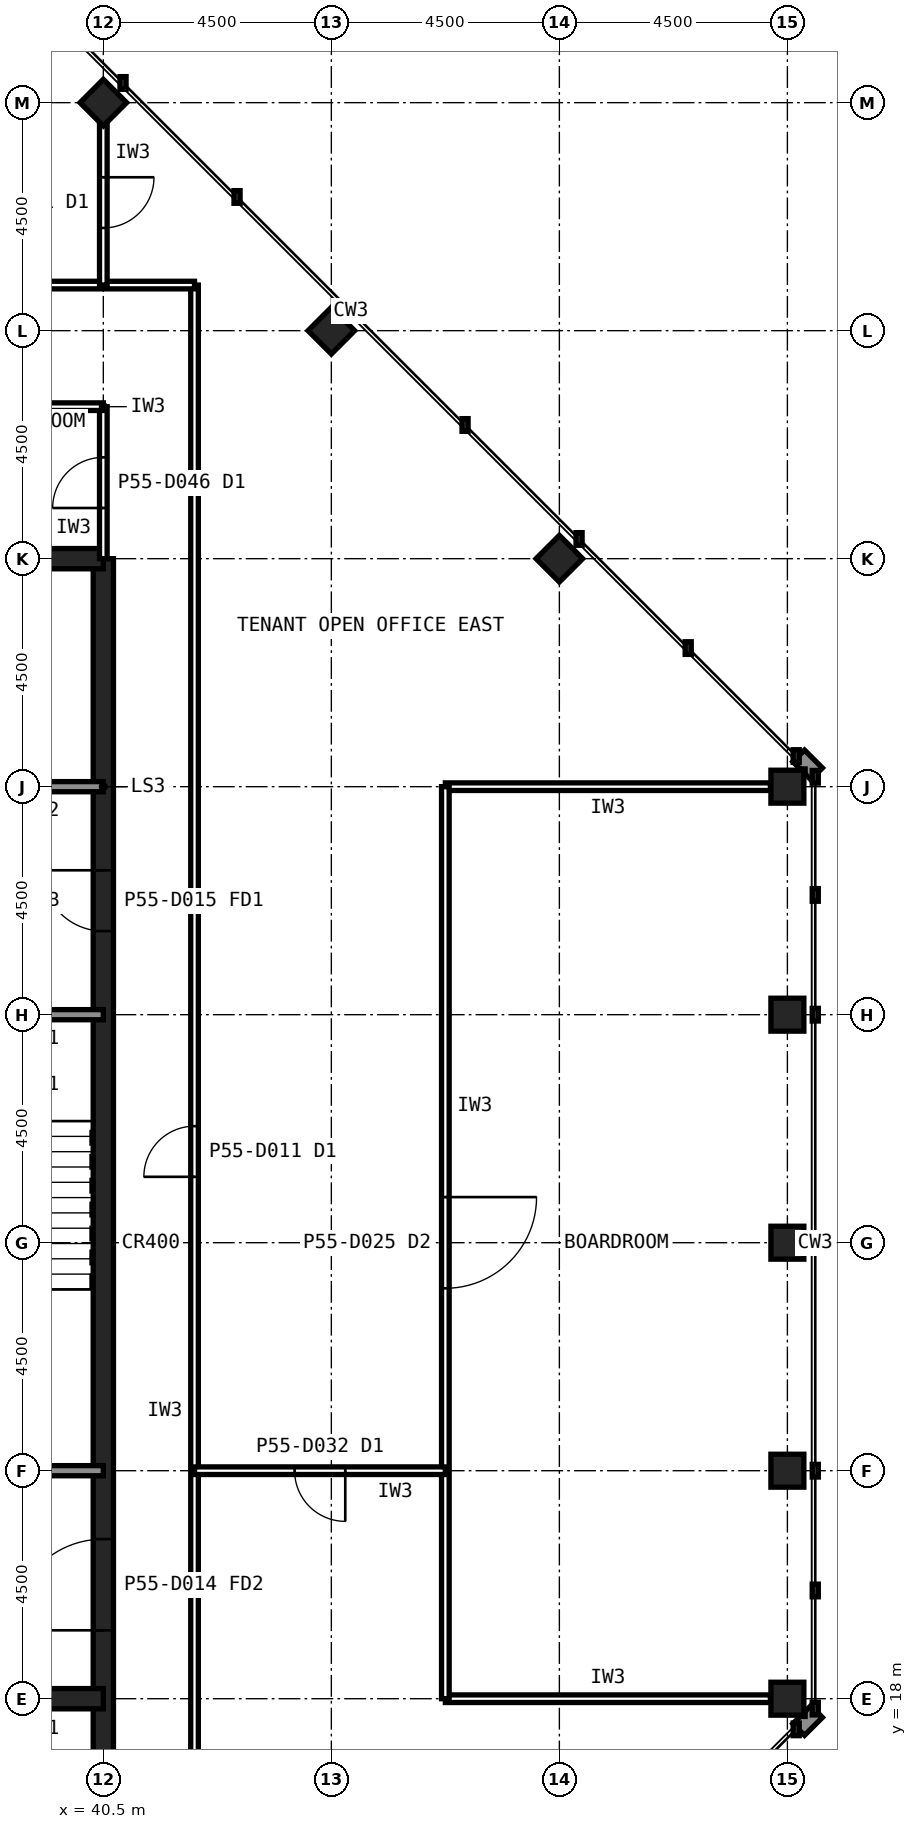
"""IFC4 building model, lengths in metres.
Left out: names, types, materials, properties, quantities, classifications, styles, units other than length and angle.
Written with IfcOpenShell. Run it as: python <this file> out.ifc"""

import sys

from ifc_helpers import new_model, si_unit, direction, frame, frame_2d, origin, origin_2d, place, context, subcontext, project, spatial, rectangle, hollow_rectangle, extrude, element, fill, save


model = new_model("IFC4")
c1 = context("Model", 3, precision=1e-05, world=origin(), true_north=direction((0.0, 1.0)))
c2 = subcontext(c1, "Body", "Model", "MODEL_VIEW")
j1 = project(units=[si_unit("LENGTHUNIT", "METRE"), si_unit("PLANEANGLEUNIT", "RADIAN")], contexts=[c1])
p1 = place(None, origin())
s1 = spatial("IfcSite", under=j1, at=p1, CompositionType="ELEMENT")
p2 = place(p1, origin())
s2 = spatial("IfcBuilding", under=s1, at=p2, CompositionType="ELEMENT")
p3 = place(p2, frame((0.0, 0.0, 230.6)))
s3 = spatial("IfcBuildingStorey", under=s2, at=p3, CompositionType="ELEMENT", Elevation=230.6)
for number, where, z_axis, x_axis in (
    (1, (54.0, 18.0, 0.0), (0.0, 0.0, 1.0), (1.0, 0.0, 0.0)),
    (2, (54.0, 22.5, 0.0), (0.0, 0.0, 1.0), (1.0, 0.0, 0.0)),
    (3, (54.0, 27.0, 0.0), (0.0, 0.0, 1.0), (1.0, 0.0, 0.0)),
    (4, (54.0, 31.5, 0.0), (0.0, 0.0, 1.0), (1.0, 0.0, 0.0)),
    (5, (54.0, 36.0, 0.0), (0.0, 0.0, 1.0), (1.0, 0.0, 0.0)),
    (6, (49.5, 40.5, 0.0), (0.0, 0.0, 1.0), (0.707, 0.707, 0.0)),
    (7, (45.0, 45.0, 0.0), (0.0, 0.0, 1.0), (0.707, 0.707, 0.0)),
    (8, (40.5, 49.5, 0.0), (0.0, 0.0, 1.0), (0.707, 0.707, 0.0)),
):
    element("IfcColumn", number, at=place(p3, frame(where, z_axis=z_axis, x_axis=x_axis)), inside=s3, PredefinedType="COLUMN", context=c2, shape_type="SweptSolid", body=[
        extrude(hollow_rectangle(XDim=0.65, YDim=0.65, WallThickness=0.032, at=origin_2d()), origin(), (0.0, 0.0, 1.0), 4.0),
    ])
p4 = place(p3, frame((40.5, 13.5, 0.0), z_axis=(0.0, 0.0, 1.0), x_axis=(0.0, 1.0, 0.0)))
e9 = element("IfcWall", 9, at=p4, inside=s3, PredefinedType="SHEAR", context=c2, shape_type="SweptSolid", body=[
    extrude(rectangle(XDim=27.0, YDim=0.4, at=frame_2d((13.5, 0.0))), origin(), (0.0, 0.0, 1.0), 4.0),
])
p5 = place(p4, frame((5.85, 0.0, 0.0)))
e10 = element("IfcOpeningElement", 10, at=p5, cuts=e9, PredefinedType="OPENING", context=c2, shape_type="SweptSolid", body=[
    extrude(rectangle(XDim=1.8, YDim=2.1, at=frame_2d((0.9, 1.05))), frame((0.0, 0.21, 0.0), z_axis=(0.0, -1.0, 0.0), x_axis=(1.0, 0.0, 0.0)), (0.0, 0.0, 1.0), 0.42),
])
p6 = place(p4, frame((19.65, 0.0, 0.0)))
e11 = element("IfcOpeningElement", 11, at=p6, cuts=e9, PredefinedType="OPENING", context=c2, shape_type="SweptSolid", body=[
    extrude(rectangle(XDim=1.2, YDim=2.1, at=frame_2d((0.6, 1.05))), frame((0.0, 0.21, 0.0), z_axis=(0.0, -1.0, 0.0), x_axis=(1.0, 0.0, 0.0)), (0.0, 0.0, 1.0), 0.42),
])
p7 = place(p3, frame((40.5, 40.5, 0.0), z_axis=(0.0, 0.0, 1.0), x_axis=(-1.0, 0.0, 0.0)))
e12 = element("IfcWall", 12, at=p7, inside=s3, PredefinedType="SHEAR", context=c2, shape_type="SweptSolid", body=[
    extrude(rectangle(XDim=27.0, YDim=0.4, at=frame_2d((13.5, 0.0))), origin(), (0.0, 0.0, 1.0), 4.0),
])
p8 = place(p3, frame((13.5, 18.0, 0.0), z_axis=(0.0, 0.0, 1.0), x_axis=(1.0, 0.0, 0.0)))
e13 = element("IfcWall", 13, at=p8, inside=s3, PredefinedType="SHEAR", context=c2, shape_type="SweptSolid", body=[
    extrude(rectangle(XDim=27.0, YDim=0.4, at=frame_2d((13.5, 0.0))), origin(), (0.0, 0.0, 1.0), 4.0),
])
p9 = place(p8, frame((24.3, 0.0, 0.0)))
e14 = element("IfcOpeningElement", 14, at=p9, cuts=e13, PredefinedType="OPENING", context=c2, shape_type="SweptSolid", body=[
    extrude(rectangle(XDim=0.9, YDim=2.1, at=frame_2d((0.45, 1.05))), frame((0.0, 0.21, 0.0), z_axis=(0.0, -1.0, 0.0), x_axis=(1.0, 0.0, 0.0)), (0.0, 0.0, 1.0), 0.42),
])
p10 = place(p8, frame((5.45, 0.0, 0.0)))
e15 = element("IfcOpeningElement", 15, at=p10, cuts=e13, PredefinedType="OPENING", context=c2, shape_type="SweptSolid", body=[
    extrude(rectangle(XDim=1.1, YDim=2.1, at=frame_2d((0.55, 1.05))), frame((0.0, 0.21, 0.0), z_axis=(0.0, -1.0, 0.0), x_axis=(1.0, 0.0, 0.0)), (0.0, 0.0, 1.0), 0.42),
])
p11 = place(p8, frame((8.45, 0.0, 0.0)))
e16 = element("IfcOpeningElement", 16, at=p11, cuts=e13, PredefinedType="OPENING", context=c2, shape_type="SweptSolid", body=[
    extrude(rectangle(XDim=1.1, YDim=2.1, at=frame_2d((0.55, 1.05))), frame((0.0, 0.21, 0.0), z_axis=(0.0, -1.0, 0.0), x_axis=(1.0, 0.0, 0.0)), (0.0, 0.0, 1.0), 0.42),
])
p12 = place(p8, frame((11.45, 0.0, 0.0)))
e17 = element("IfcOpeningElement", 17, at=p12, cuts=e13, PredefinedType="OPENING", context=c2, shape_type="SweptSolid", body=[
    extrude(rectangle(XDim=1.1, YDim=2.1, at=frame_2d((0.55, 1.05))), frame((0.0, 0.21, 0.0), z_axis=(0.0, -1.0, 0.0), x_axis=(1.0, 0.0, 0.0)), (0.0, 0.0, 1.0), 0.42),
])
p13 = place(p8, frame((14.45, 0.0, 0.0)))
e18 = element("IfcOpeningElement", 18, at=p13, cuts=e13, PredefinedType="OPENING", context=c2, shape_type="SweptSolid", body=[
    extrude(rectangle(XDim=1.1, YDim=2.1, at=frame_2d((0.55, 1.05))), frame((0.0, 0.21, 0.0), z_axis=(0.0, -1.0, 0.0), x_axis=(1.0, 0.0, 0.0)), (0.0, 0.0, 1.0), 0.42),
])
p14 = place(p8, frame((17.45, 0.0, 0.0)))
e19 = element("IfcOpeningElement", 19, at=p14, cuts=e13, PredefinedType="OPENING", context=c2, shape_type="SweptSolid", body=[
    extrude(rectangle(XDim=1.1, YDim=2.1, at=frame_2d((0.55, 1.05))), frame((0.0, 0.21, 0.0), z_axis=(0.0, -1.0, 0.0), x_axis=(1.0, 0.0, 0.0)), (0.0, 0.0, 1.0), 0.42),
])
p15 = place(p8, frame((20.45, 0.0, 0.0)))
e20 = element("IfcOpeningElement", 20, at=p15, cuts=e13, PredefinedType="OPENING", context=c2, shape_type="SweptSolid", body=[
    extrude(rectangle(XDim=1.1, YDim=2.1, at=frame_2d((0.55, 1.05))), frame((0.0, 0.21, 0.0), z_axis=(0.0, -1.0, 0.0), x_axis=(1.0, 0.0, 0.0)), (0.0, 0.0, 1.0), 0.42),
])
p16 = place(p8, frame((1.6, 0.0, 0.0)))
e21 = element("IfcOpeningElement", 21, at=p16, cuts=e13, PredefinedType="OPENING", context=c2, shape_type="SweptSolid", body=[
    extrude(rectangle(XDim=1.3, YDim=2.2, at=frame_2d((0.65, 1.1))), frame((0.0, 0.21, 0.0), z_axis=(0.0, -1.0, 0.0), x_axis=(1.0, 0.0, 0.0)), (0.0, 0.0, 1.0), 0.42),
])
p17 = place(p3, frame((13.5, 36.0, 0.0), z_axis=(0.0, 0.0, 1.0), x_axis=(1.0, 0.0, 0.0)))
e22 = element("IfcWall", 22, at=p17, inside=s3, PredefinedType="SOLIDWALL", context=c2, shape_type="SweptSolid", body=[
    extrude(rectangle(XDim=27.0, YDim=0.2, at=frame_2d((13.5, 0.0))), origin(), (0.0, 0.0, 1.0), 3.84),
])
p18 = place(p17, frame((1.8, 0.0, 0.0)))
e23 = element("IfcOpeningElement", 23, at=p18, cuts=e22, PredefinedType="OPENING", context=c2, shape_type="SweptSolid", body=[
    extrude(rectangle(XDim=0.9, YDim=2.1, at=frame_2d((0.45, 1.05))), frame((0.0, 0.11, 0.0), z_axis=(0.0, -1.0, 0.0), x_axis=(1.0, 0.0, 0.0)), (0.0, 0.0, 1.0), 0.22),
])
p19 = place(p17, frame((5.55, 0.0, 0.0)))
e24 = element("IfcOpeningElement", 24, at=p19, cuts=e22, PredefinedType="OPENING", context=c2, shape_type="SweptSolid", body=[
    extrude(rectangle(XDim=0.9, YDim=2.1, at=frame_2d((0.45, 1.05))), frame((0.0, 0.11, 0.0), z_axis=(0.0, -1.0, 0.0), x_axis=(1.0, 0.0, 0.0)), (0.0, 0.0, 1.0), 0.22),
])
p20 = place(p17, frame((11.55, 0.0, 0.0)))
e25 = element("IfcOpeningElement", 25, at=p20, cuts=e22, PredefinedType="OPENING", context=c2, shape_type="SweptSolid", body=[
    extrude(rectangle(XDim=0.9, YDim=2.1, at=frame_2d((0.45, 1.05))), frame((0.0, 0.11, 0.0), z_axis=(0.0, -1.0, 0.0), x_axis=(1.0, 0.0, 0.0)), (0.0, 0.0, 1.0), 0.22),
])
p21 = place(p17, frame((14.55, 0.0, 0.0)))
e26 = element("IfcOpeningElement", 26, at=p21, cuts=e22, PredefinedType="OPENING", context=c2, shape_type="SweptSolid", body=[
    extrude(rectangle(XDim=0.9, YDim=2.1, at=frame_2d((0.45, 1.05))), frame((0.0, 0.11, 0.0), z_axis=(0.0, -1.0, 0.0), x_axis=(1.0, 0.0, 0.0)), (0.0, 0.0, 1.0), 0.22),
])
p22 = place(p17, frame((24.1, 0.0, 0.0)))
e27 = element("IfcOpeningElement", 27, at=p22, cuts=e22, PredefinedType="OPENING", context=c2, shape_type="SweptSolid", body=[
    extrude(rectangle(XDim=1.3, YDim=2.2, at=frame_2d((0.65, 1.1))), frame((0.0, 0.11, 0.0), z_axis=(0.0, -1.0, 0.0), x_axis=(1.0, 0.0, 0.0)), (0.0, 0.0, 1.0), 0.22),
])
p23 = place(p3, frame((13.5, 22.5, 0.0), z_axis=(0.0, 0.0, 1.0), x_axis=(1.0, 0.0, 0.0)))
e28 = element("IfcWall", 28, at=p23, inside=s3, PredefinedType="SOLIDWALL", context=c2, shape_type="SweptSolid", body=[
    extrude(rectangle(XDim=27.0, YDim=0.2, at=frame_2d((13.5, 0.0))), origin(), (0.0, 0.0, 1.0), 3.84),
])
p24 = place(p23, frame((1.65, 0.0, 0.0)))
e29 = element("IfcOpeningElement", 29, at=p24, cuts=e28, PredefinedType="OPENING", context=c2, shape_type="SweptSolid", body=[
    extrude(rectangle(XDim=1.2, YDim=2.1, at=frame_2d((0.6, 1.05))), frame((0.0, 0.11, 0.0), z_axis=(0.0, -1.0, 0.0), x_axis=(1.0, 0.0, 0.0)), (0.0, 0.0, 1.0), 0.22),
])
p25 = place(p23, frame((6.025, 0.0, 0.0)))
e30 = element("IfcOpeningElement", 30, at=p25, cuts=e28, PredefinedType="OPENING", context=c2, shape_type="SweptSolid", body=[
    extrude(rectangle(XDim=1.0, YDim=2.1, at=frame_2d((0.5, 1.05))), frame((0.0, 0.11, 0.0), z_axis=(0.0, -1.0, 0.0), x_axis=(1.0, 0.0, 0.0)), (0.0, 0.0, 1.0), 0.22),
])
p26 = place(p23, frame((10.525, 0.0, 0.0)))
e31 = element("IfcOpeningElement", 31, at=p26, cuts=e28, PredefinedType="OPENING", context=c2, shape_type="SweptSolid", body=[
    extrude(rectangle(XDim=1.0, YDim=2.1, at=frame_2d((0.5, 1.05))), frame((0.0, 0.11, 0.0), z_axis=(0.0, -1.0, 0.0), x_axis=(1.0, 0.0, 0.0)), (0.0, 0.0, 1.0), 0.22),
])
p27 = place(p23, frame((19.75, 0.0, 0.0)))
e32 = element("IfcOpeningElement", 32, at=p27, cuts=e28, PredefinedType="OPENING", context=c2, shape_type="SweptSolid", body=[
    extrude(rectangle(XDim=1.0, YDim=2.1, at=frame_2d((0.5, 1.05))), frame((0.0, 0.11, 0.0), z_axis=(0.0, -1.0, 0.0), x_axis=(1.0, 0.0, 0.0)), (0.0, 0.0, 1.0), 0.22),
])
p28 = place(p23, frame((15.05, 0.0, 0.0)))
e33 = element("IfcOpeningElement", 33, at=p28, cuts=e28, PredefinedType="OPENING", context=c2, shape_type="SweptSolid", body=[
    extrude(rectangle(XDim=1.4, YDim=2.4, at=frame_2d((0.7, 1.2))), frame((0.0, 0.11, 0.0), z_axis=(0.0, -1.0, 0.0), x_axis=(1.0, 0.0, 0.0)), (0.0, 0.0, 1.0), 0.22),
])
p29 = place(p3, frame((13.5, 31.5, 0.0), z_axis=(0.0, 0.0, 1.0), x_axis=(1.0, 0.0, 0.0)))
e34 = element("IfcWall", 34, at=p29, inside=s3, PredefinedType="SOLIDWALL", context=c2, shape_type="SweptSolid", body=[
    extrude(rectangle(XDim=27.0, YDim=0.2, at=frame_2d((13.5, 0.0))), origin(), (0.0, 0.0, 1.0), 3.84),
])
p30 = place(p29, frame((24.15, 0.0, 0.0)))
e35 = element("IfcOpeningElement", 35, at=p30, cuts=e34, PredefinedType="OPENING", context=c2, shape_type="SweptSolid", body=[
    extrude(rectangle(XDim=1.2, YDim=2.1, at=frame_2d((0.6, 1.05))), frame((0.0, 0.11, 0.0), z_axis=(0.0, -1.0, 0.0), x_axis=(1.0, 0.0, 0.0)), (0.0, 0.0, 1.0), 0.22),
])
p31 = place(p29, frame((15.3, 0.0, 0.0)))
e36 = element("IfcOpeningElement", 36, at=p31, cuts=e34, PredefinedType="OPENING", context=c2, shape_type="SweptSolid", body=[
    extrude(rectangle(XDim=0.9, YDim=2.1, at=frame_2d((0.45, 1.05))), frame((0.0, 0.11, 0.0), z_axis=(0.0, -1.0, 0.0), x_axis=(1.0, 0.0, 0.0)), (0.0, 0.0, 1.0), 0.22),
])
p32 = place(p29, frame((19.8, 0.0, 0.0)))
e37 = element("IfcOpeningElement", 37, at=p32, cuts=e34, PredefinedType="OPENING", context=c2, shape_type="SweptSolid", body=[
    extrude(rectangle(XDim=0.9, YDim=2.1, at=frame_2d((0.45, 1.05))), frame((0.0, 0.11, 0.0), z_axis=(0.0, -1.0, 0.0), x_axis=(1.0, 0.0, 0.0)), (0.0, 0.0, 1.0), 0.22),
])
p33 = place(p3, frame((42.3, 11.7, 0.0), z_axis=(0.0, 0.0, 1.0), x_axis=(0.0, 1.0, 0.0)))
e38 = element("IfcWall", 38, at=p33, inside=s3, PredefinedType="PARTITIONING", context=c2, shape_type="SweptSolid", body=[
    extrude(rectangle(XDim=34.2, YDim=0.15, at=frame_2d((17.1, 0.0))), origin(), (0.0, 0.0, 1.0), 3.84),
])
p34 = place(p33, frame((16.6, 0.0, 0.0)))
e39 = element("IfcOpeningElement", 39, at=p34, cuts=e38, PredefinedType="OPENING", context=c2, shape_type="SweptSolid", body=[
    extrude(rectangle(XDim=1.0, YDim=2.1, at=frame_2d((0.5, 1.05))), frame((0.0, 0.085, 0.0), z_axis=(0.0, -1.0, 0.0), x_axis=(1.0, 0.0, 0.0)), (0.0, 0.0, 1.0), 0.17),
])
p35 = place(p3, frame((42.3, 45.9, 0.0), z_axis=(0.0, 0.0, 1.0), x_axis=(-1.0, 0.0, 0.0)))
e40 = element("IfcWall", 40, at=p35, inside=s3, PredefinedType="PARTITIONING", context=c2, shape_type="SweptSolid", body=[
    extrude(rectangle(XDim=9.0, YDim=0.15, at=frame_2d((4.5, 0.0))), origin(), (0.0, 0.0, 1.0), 3.84),
])
for number, where, z_axis, x_axis in (
    (41, (47.25, 18.0, 0.0), (0.0, 0.0, 1.0), (1.0, 0.0, 0.0)),
    (42, (53.665, 36.0, 0.0), (0.0, 0.0, 1.0), (-1.0, 0.0, 0.0)),
):
    element("IfcWall", number, at=place(p3, frame(where, z_axis=z_axis, x_axis=x_axis)), inside=s3, PredefinedType="PARTITIONING", context=c2, shape_type="SweptSolid", body=[
        extrude(rectangle(XDim=6.415, YDim=0.15, at=frame_2d((3.208, 0.0))), origin(), (0.0, 0.0, 1.0), 2.989),
    ])
p36 = place(p3, frame((47.25, 36.0, 0.0), z_axis=(0.0, 0.0, 1.0), x_axis=(0.0, -1.0, 0.0)))
e43 = element("IfcWall", 43, at=p36, inside=s3, PredefinedType="PARTITIONING", context=c2, shape_type="SweptSolid", body=[
    extrude(rectangle(XDim=18.0, YDim=0.15, at=frame_2d((9.0, 0.0))), origin(), (0.0, 0.0, 1.0), 3.84),
])
p37 = place(p36, frame((8.1, 0.0, 0.0)))
e44 = element("IfcOpeningElement", 44, at=p37, cuts=e43, PredefinedType="OPENING", context=c2, shape_type="SweptSolid", body=[
    extrude(rectangle(XDim=1.8, YDim=2.4, at=frame_2d((0.9, 1.2))), frame((0.0, 0.085, 0.0), z_axis=(0.0, -1.0, 0.0), x_axis=(1.0, 0.0, 0.0)), (0.0, 0.0, 1.0), 0.17),
])
p38 = place(p3, frame((40.5, 40.5, 0.0), z_axis=(0.0, 0.0, 1.0), x_axis=(0.0, 1.0, 0.0)))
e45 = element("IfcWall", 45, at=p38, inside=s3, PredefinedType="PARTITIONING", context=c2, shape_type="SweptSolid", body=[
    extrude(rectangle(XDim=3.0, YDim=0.15, at=frame_2d((1.5, 0.0))), origin(), (0.0, 0.0, 1.0), 2.989),
])
p39 = place(p38, frame((1.0, 0.0, 0.0)))
e46 = element("IfcOpeningElement", 46, at=p39, cuts=e45, PredefinedType="OPENING", context=c2, shape_type="SweptSolid", body=[
    extrude(rectangle(XDim=1.0, YDim=2.1, at=frame_2d((0.5, 1.05))), frame((0.0, 0.085, 0.0), z_axis=(0.0, -1.0, 0.0), x_axis=(1.0, 0.0, 0.0)), (0.0, 0.0, 1.0), 0.17),
])
p40 = place(p3, frame((40.5, 43.5, 0.0), z_axis=(0.0, 0.0, 1.0), x_axis=(-1.0, 0.0, 0.0)))
e47 = element("IfcWall", 47, at=p40, inside=s3, PredefinedType="PARTITIONING", context=c2, shape_type="SweptSolid", body=[
    extrude(rectangle(XDim=3.0, YDim=0.15, at=frame_2d((1.5, 0.0))), origin(), (0.0, 0.0, 1.0), 3.84),
])
p41 = place(p3, frame((40.5, 49.155, 0.0), z_axis=(0.0, 0.0, 1.0), x_axis=(0.0, -1.0, 0.0)))
e48 = element("IfcWall", 48, at=p41, inside=s3, PredefinedType="PARTITIONING", context=c2, shape_type="SweptSolid", body=[
    extrude(rectangle(XDim=3.255, YDim=0.15, at=frame_2d((1.627, 0.0))), origin(), (0.0, 0.0, 1.0), 2.989),
])
p42 = place(p41, frame((1.127, 0.0, 0.0)))
e49 = element("IfcOpeningElement", 49, at=p42, cuts=e48, PredefinedType="OPENING", context=c2, shape_type="SweptSolid", body=[
    extrude(rectangle(XDim=1.0, YDim=2.1, at=frame_2d((0.5, 1.05))), frame((0.0, 0.085, 0.0), z_axis=(0.0, -1.0, 0.0), x_axis=(1.0, 0.0, 0.0)), (0.0, 0.0, 1.0), 0.17),
])
p43 = place(p3, frame((47.25, 22.5, 0.0), z_axis=(0.0, 0.0, 1.0), x_axis=(-1.0, 0.0, 0.0)))
e50 = element("IfcWall", 50, at=p43, inside=s3, PredefinedType="PARTITIONING", context=c2, shape_type="SweptSolid", body=[
    extrude(rectangle(XDim=4.95, YDim=0.15, at=frame_2d((2.475, 0.0))), origin(), (0.0, 0.0, 1.0), 2.989),
])
p44 = place(p43, frame((1.975, 0.0, 0.0)))
e51 = element("IfcOpeningElement", 51, at=p44, cuts=e50, PredefinedType="OPENING", context=c2, shape_type="SweptSolid", body=[
    extrude(rectangle(XDim=1.0, YDim=2.1, at=frame_2d((0.5, 1.05))), frame((0.0, 0.085, 0.0), z_axis=(0.0, -1.0, 0.0), x_axis=(1.0, 0.0, 0.0)), (0.0, 0.0, 1.0), 0.17),
])
p45 = place(p5, origin())
e52 = element("IfcDoor", 52, at=p45, inside=s3, OperationType="SINGLE_SWING_LEFT", PredefinedType="DOOR", context=c2, shape_type="SweptSolid", body=[
    extrude(rectangle(XDim=1.8, YDim=2.1, at=frame_2d((0.9, 1.05))), frame((0.0, 0.025, 0.0), z_axis=(0.0, -1.0, 0.0), x_axis=(1.0, 0.0, 0.0)), (0.0, 0.0, 1.0), 0.05),
])
fill(e10, e52)
p46 = place(p6, origin())
e53 = element("IfcDoor", 53, at=p46, inside=s3, OperationType="SINGLE_SWING_RIGHT", PredefinedType="DOOR", context=c2, shape_type="SweptSolid", body=[
    extrude(rectangle(XDim=1.2, YDim=2.1, at=frame_2d((0.6, 1.05))), frame((0.0, 0.025, 0.0), z_axis=(0.0, -1.0, 0.0), x_axis=(1.0, 0.0, 0.0)), (0.0, 0.0, 1.0), 0.05),
])
fill(e11, e53)
p47 = place(p34, origin())
e54 = element("IfcDoor", 54, at=p47, inside=s3, OperationType="SINGLE_SWING_LEFT", PredefinedType="DOOR", context=c2, shape_type="SweptSolid", body=[
    extrude(rectangle(XDim=1.0, YDim=2.1, at=frame_2d((0.5, 1.05))), frame((0.0, 0.025, 0.0), z_axis=(0.0, -1.0, 0.0), x_axis=(1.0, 0.0, 0.0)), (0.0, 0.0, 1.0), 0.05),
])
fill(e39, e54)
p48 = place(p37, origin())
e55 = element("IfcDoor", 55, at=p48, inside=s3, OperationType="SINGLE_SWING_LEFT", PredefinedType="DOOR", context=c2, shape_type="SweptSolid", body=[
    extrude(rectangle(XDim=1.8, YDim=2.4, at=frame_2d((0.9, 1.2))), frame((0.0, 0.025, 0.0), z_axis=(0.0, -1.0, 0.0), x_axis=(1.0, 0.0, 0.0)), (0.0, 0.0, 1.0), 0.05),
])
fill(e44, e55)
p49 = place(p39, origin())
e56 = element("IfcDoor", 56, at=p49, inside=s3, OperationType="SINGLE_SWING_LEFT", PredefinedType="DOOR", context=c2, shape_type="SweptSolid", body=[
    extrude(rectangle(XDim=1.0, YDim=2.1, at=frame_2d((0.5, 1.05))), frame((0.0, 0.025, 0.0), z_axis=(0.0, -1.0, 0.0), x_axis=(1.0, 0.0, 0.0)), (0.0, 0.0, 1.0), 0.05),
])
fill(e46, e56)
p50 = place(p42, origin())
e57 = element("IfcDoor", 57, at=p50, inside=s3, OperationType="SINGLE_SWING_LEFT", PredefinedType="DOOR", context=c2, shape_type="SweptSolid", body=[
    extrude(rectangle(XDim=1.0, YDim=2.1, at=frame_2d((0.5, 1.05))), frame((0.0, 0.025, 0.0), z_axis=(0.0, -1.0, 0.0), x_axis=(1.0, 0.0, 0.0)), (0.0, 0.0, 1.0), 0.05),
])
fill(e49, e57)
p51 = place(p44, origin())
e58 = element("IfcDoor", 58, at=p51, inside=s3, OperationType="SINGLE_SWING_LEFT", PredefinedType="DOOR", context=c2, shape_type="SweptSolid", body=[
    extrude(rectangle(XDim=1.0, YDim=2.1, at=frame_2d((0.5, 1.05))), frame((0.0, 0.025, 0.0), z_axis=(0.0, -1.0, 0.0), x_axis=(1.0, 0.0, 0.0)), (0.0, 0.0, 1.0), 0.05),
])
fill(e51, e58)
save(model, sys.argv[1])
